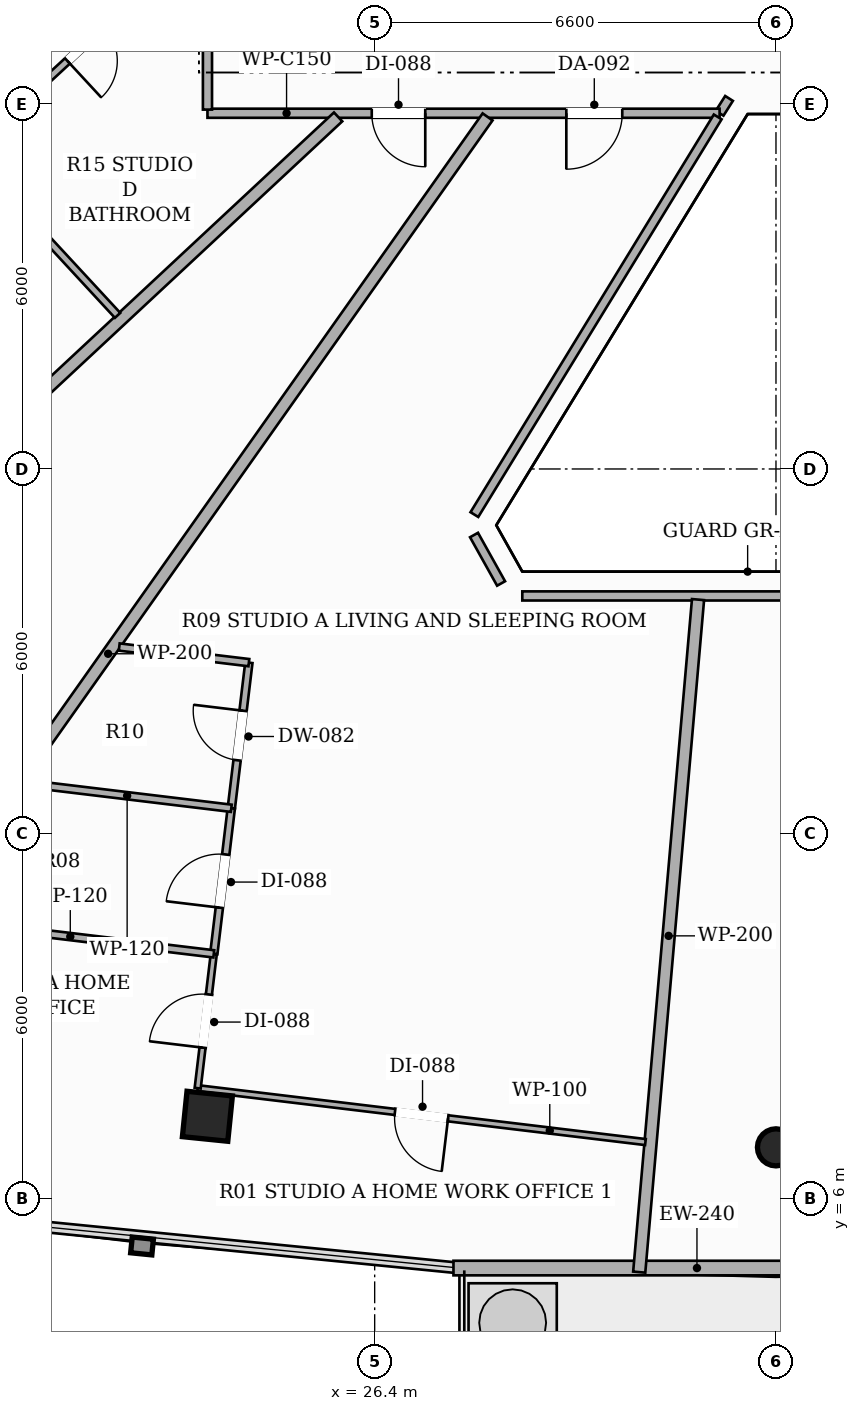
"""IFC4 building model, lengths in metres.
Left out: names, types, materials, properties, quantities, classifications, styles, units other than length and angle.
Written with IfcOpenShell. Run it as: python <this file> out.ifc"""

import sys

from ifc_helpers import new_model, si_unit, direction, frame, frame_2d, origin, origin_2d, place, context, subcontext, project, spatial, rectangle, hollow_rectangle, hollow_circle, extrude, element, fill, save


model = new_model("IFC4")
c1 = context("Model", 3, precision=1e-05, world=origin(), true_north=direction((0.0, 1.0)))
c2 = subcontext(c1, "Body", "Model", "MODEL_VIEW")
j1 = project(units=[si_unit("LENGTHUNIT", "METRE"), si_unit("PLANEANGLEUNIT", "RADIAN")], contexts=[c1])
p1 = place(None, origin())
s1 = spatial("IfcSite", under=j1, at=p1, CompositionType="ELEMENT")
p2 = place(p1, origin())
s2 = spatial("IfcBuilding", under=s1, at=p2, CompositionType="ELEMENT")
p3 = place(p2, frame((0.0, 0.0, 219.5)))
s3 = spatial("IfcBuildingStorey", under=s2, at=p3, CompositionType="ELEMENT", Elevation=219.5)
p4 = place(p3, frame((23.649, 7.355, 0.0), z_axis=(0.0, 0.0, 1.0), x_axis=(-0.994880708829, 0.101056297183, 0.0)))
e1 = element("IfcColumn", 1, at=p4, inside=s3, PredefinedType="COLUMN", context=c2, shape_type="SweptSolid", body=[
    extrude(hollow_rectangle(XDim=0.75, YDim=0.75, WallThickness=0.025, at=origin_2d()), origin(), (0.0, 0.0, 1.0), 3.3),
])
p5 = place(p3, frame((33.0, 6.844, 0.0), z_axis=(0.0, 0.0, 1.0), x_axis=(1.0, 0.0, 0.0)))
e2 = element("IfcColumn", 2, at=p5, inside=s3, PredefinedType="COLUMN", context=c2, shape_type="SweptSolid", body=[
    extrude(hollow_circle(Radius=0.305, WallThickness=0.016, at=origin_2d()), origin(), (0.0, 0.0, 1.0), 3.3),
])
p6 = place(p3, frame((21.458, 33.042, 0.0), z_axis=(0.0, 0.0, 1.0), x_axis=(-0.51433465168, -0.857589567381, 0.0)))
e3 = element("IfcWall", 3, at=p6, inside=s3, PredefinedType="SOLIDWALL", context=c2, shape_type="SweptSolid", body=[
    extrude(rectangle(XDim=10.252, YDim=0.24, at=frame_2d((5.126, 0.0))), origin(), (0.0, 0.0, 1.0), 2.624),
])
p7 = place(p6, frame((7.754, 0.0, 0.0)))
e4 = element("IfcOpeningElement", 4, at=p7, cuts=e3, PredefinedType="OPENING", context=c2, shape_type="SweptSolid", body=[
    extrude(rectangle(XDim=1.8, YDim=2.2, at=frame_2d((0.9, 1.1))), frame((0.0, 0.13, 0.0), z_axis=(0.0, -1.0, 0.0), x_axis=(1.0, 0.0, 0.0)), (0.0, 0.0, 1.0), 0.26),
])
p8 = place(p3, frame((27.696, 4.859, 0.0), z_axis=(0.0, 0.0, 1.0), x_axis=(1.0, 0.0, 0.0)))
e5 = element("IfcWall", 5, at=p8, inside=s3, PredefinedType="SOLIDWALL", context=c2, shape_type="SweptSolid", body=[
    extrude(rectangle(XDim=10.608, YDim=0.24, at=frame_2d((5.304, 0.0))), origin(), (0.0, 0.0, 1.0), 2.624),
])
p9 = place(p8, frame((8.109, 0.0, 0.0)))
e6 = element("IfcOpeningElement", 6, at=p9, cuts=e5, PredefinedType="OPENING", context=c2, shape_type="SweptSolid", body=[
    extrude(rectangle(XDim=1.8, YDim=2.2, at=frame_2d((0.9, 1.1))), frame((0.0, 0.13, 0.0), z_axis=(0.0, -1.0, 0.0), x_axis=(1.0, 0.0, 0.0)), (0.0, 0.0, 1.0), 0.26),
])
p10 = place(p3, frame((32.228, 24.094, 0.0), z_axis=(0.0, 0.0, 1.0), x_axis=(-0.53643811989, -0.843939656331, 0.0)))
e7 = element("IfcWall", 7, at=p10, inside=s3, PredefinedType="PARTITIONING", context=c2, shape_type="SweptSolid", body=[
    extrude(rectangle(XDim=0.289, YDim=0.15, at=frame_2d((0.145, 0.0))), origin(), (0.0, 0.0, 1.0), 3.06),
])
p11 = place(p3, frame((32.073, 23.85, 0.0), z_axis=(0.0, 0.0, 1.0), x_axis=(-1.0, 0.0, 0.0)))
e8 = element("IfcWall", 8, at=p11, inside=s3, PredefinedType="PARTITIONING", context=c2, shape_type="SweptSolid", body=[
    extrude(rectangle(XDim=8.423, YDim=0.15, at=frame_2d((4.211, 0.0))), origin(), (0.0, 0.0, 1.0), 2.565),
])
p12 = place(p11, frame((1.601, 0.0, 0.0)))
e9 = element("IfcOpeningElement", 9, at=p12, cuts=e8, PredefinedType="OPENING", context=c2, shape_type="SweptSolid", body=[
    extrude(rectangle(XDim=0.92, YDim=2.15, at=frame_2d((0.46, 1.075))), frame((0.0, 0.085, 0.0), z_axis=(0.0, -1.0, 0.0), x_axis=(1.0, 0.0, 0.0)), (0.0, 0.0, 1.0), 0.17),
])
p13 = place(p11, frame((4.841, 0.0, 0.0)))
e10 = element("IfcOpeningElement", 10, at=p13, cuts=e8, PredefinedType="OPENING", context=c2, shape_type="SweptSolid", body=[
    extrude(rectangle(XDim=0.88, YDim=2.1, at=frame_2d((0.44, 1.05))), frame((0.0, 0.085, 0.0), z_axis=(0.0, -1.0, 0.0), x_axis=(1.0, 0.0, 0.0)), (0.0, 0.0, 1.0), 0.17),
])
p14 = place(p3, frame((23.65, 23.91, 0.0), z_axis=(0.0, 0.0, 1.0), x_axis=(0.0, 1.0, 0.0)))
e11 = element("IfcWall", 11, at=p14, inside=s3, PredefinedType="PARTITIONING", context=c2, shape_type="SweptSolid", body=[
    extrude(rectangle(XDim=12.163, YDim=0.15, at=frame_2d((6.082, 0.0))), origin(), (0.0, 0.0, 1.0), 2.492),
])
p15 = place(p14, frame((5.622, 0.0, 0.0)))
e12 = element("IfcOpeningElement", 12, at=p15, cuts=e11, PredefinedType="OPENING", context=c2, shape_type="SweptSolid", body=[
    extrude(rectangle(XDim=0.92, YDim=2.15, at=frame_2d((0.46, 1.075))), frame((0.0, 0.085, 0.0), z_axis=(0.0, -1.0, 0.0), x_axis=(1.0, 0.0, 0.0)), (0.0, 0.0, 1.0), 0.17),
])
p16 = place(p3, frame((37.172, 15.912, 0.0), z_axis=(0.0, 0.0, 1.0), x_axis=(-1.0, 0.0, 0.0)))
e13 = element("IfcWall", 13, at=p16, inside=s3, PredefinedType="PARTITIONING", context=c2, shape_type="SweptSolid", body=[
    extrude(rectangle(XDim=8.344, YDim=0.15, at=frame_2d((4.172, 0.0))), origin(), (0.0, 0.0, 1.0), 2.773),
])
p17 = place(p3, frame((28.479, 16.117, 0.0), z_axis=(0.0, 0.0, 1.0), x_axis=(-0.487503666908, 0.873120939361, 0.0)))
e14 = element("IfcWall", 14, at=p17, inside=s3, PredefinedType="PARTITIONING", context=c2, shape_type="SweptSolid", body=[
    extrude(rectangle(XDim=0.913, YDim=0.15, at=frame_2d((0.457, 0.0))), origin(), (0.0, 0.0, 1.0), 3.06),
])
p18 = place(p3, frame((28.04, 17.25, 0.0), z_axis=(0.0, 0.0, 1.0), x_axis=(0.521949656317, 0.852976292912, 0.0)))
e15 = element("IfcWall", 15, at=p18, inside=s3, PredefinedType="PARTITIONING", context=c2, shape_type="SweptSolid", body=[
    extrude(rectangle(XDim=7.667, YDim=0.15, at=frame_2d((3.833, 0.0))), origin(), (0.0, 0.0, 1.0), 2.773),
])
p19 = place(p3, frame((31.718, 15.852, 0.0), z_axis=(0.0, 0.0, 1.0), x_axis=(-0.087103117533, -0.996199300801, 0.0)))
e16 = element("IfcWall", 16, at=p19, inside=s3, PredefinedType="PARTITIONING", context=c2, shape_type="SweptSolid", body=[
    extrude(rectangle(XDim=11.102, YDim=0.2, at=frame_2d((5.551, 0.0))), origin(), (0.0, 0.0, 1.0), 2.492),
])
p20 = place(p3, frame((15.776, 6.132, 0.0), z_axis=(0.0, 0.0, 1.0), x_axis=(0.577200381612, 0.816602546816, 0.0)))
e17 = element("IfcWall", 17, at=p20, inside=s3, PredefinedType="PARTITIONING", context=c2, shape_type="SweptSolid", body=[
    extrude(rectangle(XDim=21.624, YDim=0.2, at=frame_2d((10.812, 0.0))), origin(), (0.0, 0.0, 1.0), 2.492),
])
p21 = place(p3, frame((25.799, 23.79, 0.0), z_axis=(0.0, 0.0, 1.0), x_axis=(-0.731584830333, -0.681750420629, 0.0)))
e18 = element("IfcWall", 18, at=p21, inside=s3, PredefinedType="PARTITIONING", context=c2, shape_type="SweptSolid", body=[
    extrude(rectangle(XDim=21.776, YDim=0.2, at=frame_2d((10.888, 0.0))), origin(), (0.0, 0.0, 1.0), 2.492),
])
p22 = place(p3, frame((24.042, 12.42, 0.0), z_axis=(0.0, 0.0, 1.0), x_axis=(0.119823599825, 0.992795197876, 0.0)))
e19 = element("IfcWall", 19, at=p22, inside=s3, PredefinedType="PARTITIONING", context=c2, shape_type="SweptSolid", body=[
    extrude(rectangle(XDim=2.412, YDim=0.12, at=frame_2d((1.206, 0.0))), origin(), (0.0, 0.0, 1.0), 3.06),
])
p23 = place(p22, frame((0.796, 0.0, 0.0)))
e20 = element("IfcOpeningElement", 20, at=p23, cuts=e19, PredefinedType="OPENING", context=c2, shape_type="SweptSolid", body=[
    extrude(rectangle(XDim=0.82, YDim=2.1, at=frame_2d((0.41, 1.05))), frame((0.0, 0.07, 0.0), z_axis=(0.0, -1.0, 0.0), x_axis=(1.0, 0.0, 0.0)), (0.0, 0.0, 1.0), 0.14),
])
p24 = place(p3, frame((24.331, 14.815, 0.0), z_axis=(0.0, 0.0, 1.0), x_axis=(-0.992808897326, 0.119710038805, 0.0)))
e21 = element("IfcWall", 21, at=p24, inside=s3, PredefinedType="PARTITIONING", context=c2, shape_type="SweptSolid", body=[
    extrude(rectangle(XDim=2.147, YDim=0.12, at=frame_2d((1.074, 0.0))), origin(), (0.0, 0.0, 1.0), 3.06),
])
p25 = place(p3, frame((23.754, 10.026, 0.0), z_axis=(0.0, 0.0, 1.0), x_axis=(0.119472593193, 0.992837499028, 0.0)))
e22 = element("IfcWall", 22, at=p25, inside=s3, PredefinedType="PARTITIONING", context=c2, shape_type="SweptSolid", body=[
    extrude(rectangle(XDim=2.411, YDim=0.12, at=frame_2d((1.206, 0.0))), origin(), (0.0, 0.0, 1.0), 3.06),
])
p26 = place(p25, frame((0.766, 0.0, 0.0)))
e23 = element("IfcOpeningElement", 23, at=p26, cuts=e22, PredefinedType="OPENING", context=c2, shape_type="SweptSolid", body=[
    extrude(rectangle(XDim=0.88, YDim=2.1, at=frame_2d((0.44, 1.05))), frame((0.0, 0.07, 0.0), z_axis=(0.0, -1.0, 0.0), x_axis=(1.0, 0.0, 0.0)), (0.0, 0.0, 1.0), 0.14),
])
p27 = place(p3, frame((30.853, 6.931, 0.0), z_axis=(0.0, 0.0, 1.0), x_axis=(-0.992840033501, 0.119451529409, 0.0)))
e24 = element("IfcWall", 24, at=p27, inside=s3, PredefinedType="PARTITIONING", context=c2, shape_type="SweptSolid", body=[
    extrude(rectangle(XDim=7.417, YDim=0.1, at=frame_2d((3.708, 0.0))), origin(), (0.0, 0.0, 1.0), 2.492),
])
p28 = place(p27, frame((3.269, 0.0, 0.0)))
e25 = element("IfcOpeningElement", 25, at=p28, cuts=e24, PredefinedType="OPENING", context=c2, shape_type="SweptSolid", body=[
    extrude(rectangle(XDim=0.88, YDim=2.1, at=frame_2d((0.44, 1.05))), frame((0.0, 0.06, 0.0), z_axis=(0.0, -1.0, 0.0), x_axis=(1.0, 0.0, 0.0)), (0.0, 0.0, 1.0), 0.12),
])
p29 = place(p3, frame((23.489, 7.817, 0.0), z_axis=(0.0, 0.0, 1.0), x_axis=(0.119063005136, 0.992886700892, 0.0)))
e26 = element("IfcWall", 26, at=p29, inside=s3, PredefinedType="PARTITIONING", context=c2, shape_type="SweptSolid", body=[
    extrude(rectangle(XDim=2.225, YDim=0.1, at=frame_2d((1.112, 0.0))), origin(), (0.0, 0.0, 1.0), 2.492),
])
p30 = place(p29, frame((0.672, 0.0, 0.0)))
e27 = element("IfcOpeningElement", 27, at=p30, cuts=e26, PredefinedType="OPENING", context=c2, shape_type="SweptSolid", body=[
    extrude(rectangle(XDim=0.88, YDim=2.1, at=frame_2d((0.44, 1.05))), frame((0.0, 0.06, 0.0), z_axis=(0.0, -1.0, 0.0), x_axis=(1.0, 0.0, 0.0)), (0.0, 0.0, 1.0), 0.12),
])
p31 = place(p3, frame((24.042, 12.42, 0.0), z_axis=(0.0, 0.0, 1.0), x_axis=(-0.992809391247, 0.119705942421, 0.0)))
e28 = element("IfcWall", 28, at=p31, inside=s3, PredefinedType="PARTITIONING", context=c2, shape_type="SweptSolid", body=[
    extrude(rectangle(XDim=3.451, YDim=0.12, at=frame_2d((1.726, 0.0))), origin(), (0.0, 0.0, 1.0), 2.773),
])
p32 = place(p3, frame((23.754, 10.026, 0.0), z_axis=(0.0, 0.0, 1.0), x_axis=(-0.992834006213, 0.1195016155, 0.0)))
e29 = element("IfcWall", 29, at=p32, inside=s3, PredefinedType="PARTITIONING", context=c2, shape_type="SweptSolid", body=[
    extrude(rectangle(XDim=4.754, YDim=0.12, at=frame_2d((2.377, 0.0))), origin(), (0.0, 0.0, 1.0), 2.773),
])
p33 = place(p3, frame((23.59, 26.786, 0.0), z_axis=(0.0, 0.0, 1.0), x_axis=(-0.733888422473, -0.679270037143, 0.0)))
e30 = element("IfcWall", 30, at=p33, inside=s3, PredefinedType="PARTITIONING", context=c2, shape_type="SweptSolid", body=[
    extrude(rectangle(XDim=5.292, YDim=0.12, at=frame_2d((2.646, 0.0))), origin(), (0.0, 0.0, 1.0), 3.06),
])
p34 = place(p33, frame((2.236, 0.0, 0.0)))
e31 = element("IfcOpeningElement", 31, at=p34, cuts=e30, PredefinedType="OPENING", context=c2, shape_type="SweptSolid", body=[
    extrude(rectangle(XDim=0.82, YDim=2.1, at=frame_2d((0.41, 1.05))), frame((0.0, 0.07, 0.0), z_axis=(0.0, -1.0, 0.0), x_axis=(1.0, 0.0, 0.0)), (0.0, 0.0, 1.0), 0.14),
])
p35 = place(p3, frame((22.172, 20.526, 0.0), z_axis=(0.0, 0.0, 1.0), x_axis=(-0.67917603964, 0.733975413198, 0.0)))
e32 = element("IfcWall", 32, at=p35, inside=s3, PredefinedType="PARTITIONING", context=c2, shape_type="SweptSolid", body=[
    extrude(rectangle(XDim=3.631, YDim=0.12, at=frame_2d((1.815, 0.0))), origin(), (0.0, 0.0, 1.0), 2.565),
])
p36 = place(p12, origin())
e33 = element("IfcDoor", 33, at=p36, inside=s3, OperationType="SINGLE_SWING_RIGHT", PredefinedType="DOOR", context=c2, shape_type="SweptSolid", body=[
    extrude(rectangle(XDim=0.92, YDim=2.15, at=frame_2d((0.46, 1.075))), frame((0.0, 0.025, 0.0), z_axis=(0.0, -1.0, 0.0), x_axis=(1.0, 0.0, 0.0)), (0.0, 0.0, 1.0), 0.05),
])
fill(e9, e33)
p37 = place(p23, origin())
e34 = element("IfcDoor", 34, at=p37, inside=s3, OperationType="SINGLE_SWING_RIGHT", PredefinedType="DOOR", context=c2, shape_type="SweptSolid", body=[
    extrude(rectangle(XDim=0.82, YDim=2.1, at=frame_2d((0.41, 1.05))), frame((0.0, 0.025, 0.0), z_axis=(0.0, -1.0, 0.0), x_axis=(1.0, 0.0, 0.0)), (0.0, 0.0, 1.0), 0.05),
])
fill(e20, e34)
p38 = place(p26, origin())
e35 = element("IfcDoor", 35, at=p38, inside=s3, OperationType="SINGLE_SWING_LEFT", PredefinedType="DOOR", context=c2, shape_type="SweptSolid", body=[
    extrude(rectangle(XDim=0.88, YDim=2.1, at=frame_2d((0.44, 1.05))), frame((0.0, 0.025, 0.0), z_axis=(0.0, -1.0, 0.0), x_axis=(1.0, 0.0, 0.0)), (0.0, 0.0, 1.0), 0.05),
])
fill(e23, e35)
p39 = place(p28, origin())
e36 = element("IfcDoor", 36, at=p39, inside=s3, OperationType="SINGLE_SWING_LEFT", PredefinedType="DOOR", context=c2, shape_type="SweptSolid", body=[
    extrude(rectangle(XDim=0.88, YDim=2.1, at=frame_2d((0.44, 1.05))), frame((0.0, 0.025, 0.0), z_axis=(0.0, -1.0, 0.0), x_axis=(1.0, 0.0, 0.0)), (0.0, 0.0, 1.0), 0.05),
])
fill(e25, e36)
p40 = place(p30, origin())
e37 = element("IfcDoor", 37, at=p40, inside=s3, OperationType="SINGLE_SWING_LEFT", PredefinedType="DOOR", context=c2, shape_type="SweptSolid", body=[
    extrude(rectangle(XDim=0.88, YDim=2.1, at=frame_2d((0.44, 1.05))), frame((0.0, 0.025, 0.0), z_axis=(0.0, -1.0, 0.0), x_axis=(1.0, 0.0, 0.0)), (0.0, 0.0, 1.0), 0.05),
])
fill(e27, e37)
p41 = place(p34, origin())
e38 = element("IfcDoor", 38, at=p41, inside=s3, OperationType="SINGLE_SWING_RIGHT", PredefinedType="DOOR", context=c2, shape_type="SweptSolid", body=[
    extrude(rectangle(XDim=0.82, YDim=2.1, at=frame_2d((0.41, 1.05))), frame((0.0, 0.025, 0.0), z_axis=(0.0, -1.0, 0.0), x_axis=(1.0, 0.0, 0.0)), (0.0, 0.0, 1.0), 0.05),
])
fill(e31, e38)
p42 = place(p13, origin())
e39 = element("IfcDoor", 39, at=p42, inside=s3, OperationType="SINGLE_SWING_LEFT", PredefinedType="DOOR", context=c2, shape_type="SweptSolid", body=[
    extrude(rectangle(XDim=0.88, YDim=2.1, at=frame_2d((0.44, 1.05))), frame((0.0, 0.025, 0.0), z_axis=(0.0, -1.0, 0.0), x_axis=(1.0, 0.0, 0.0)), (0.0, 0.0, 1.0), 0.05),
])
fill(e10, e39)
save(model, sys.argv[1])
